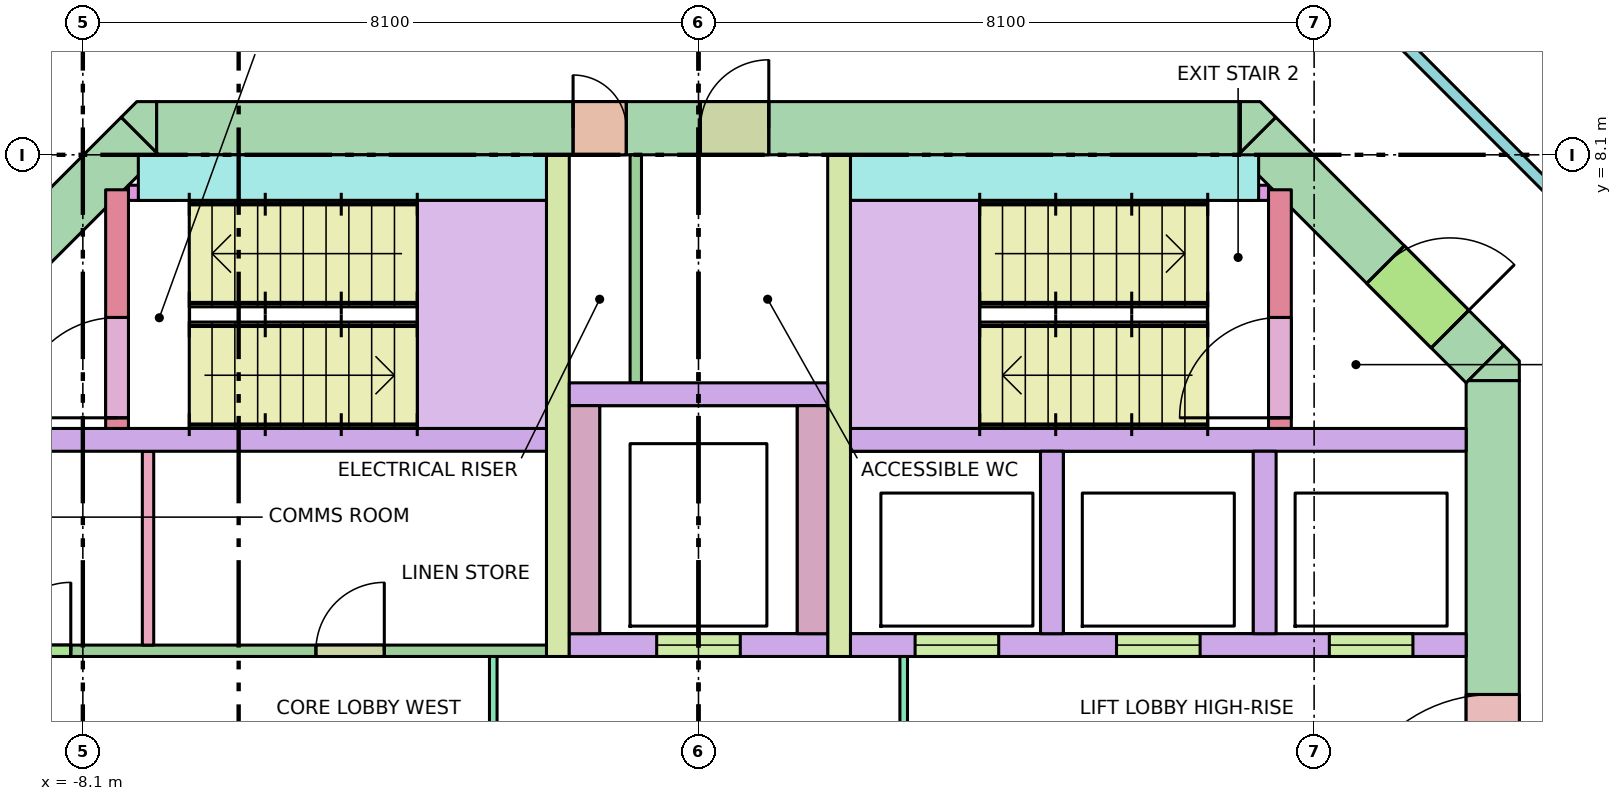
"""IFC4 building model, lengths in metres.
Left out: names, types, materials, properties, quantities, classifications, styles, units other than length and angle.
Written with IfcOpenShell. Run it as: python <this file> out.ifc"""

import sys

from ifc_helpers import new_model, si_unit, direction, frame, frame_2d, origin, place, context, subcontext, project, spatial, polyline, rectangle, outline, extrude, element, fill, save


model = new_model("IFC4")
c1 = context("Model", 3, precision=1e-05, world=origin(), true_north=direction((0.0, 1.0)))
c2 = subcontext(c1, "Body", "Model", "MODEL_VIEW")
j1 = project(units=[si_unit("LENGTHUNIT", "METRE"), si_unit("PLANEANGLEUNIT", "RADIAN")], contexts=[c1])
p1 = place(None, origin())
s1 = spatial("IfcSite", under=j1, at=p1, CompositionType="ELEMENT")
p2 = place(p1, origin())
s2 = spatial("IfcBuilding", under=s1, at=p2, CompositionType="ELEMENT")
p3 = place(p2, frame((0.0, 0.0, 176.4)))
s3 = spatial("IfcBuildingStorey", under=s2, at=p3, CompositionType="ELEMENT", Elevation=176.4)
p4 = place(p3, frame((-7.13, 8.45, -0.28), z_axis=(0.0, 0.0, 1.0), x_axis=(1.0, 0.0, 0.0)))
e1 = element("IfcWall", 1, at=p4, inside=s3, PredefinedType="SHEAR", context=c2, shape_type="SweptSolid", body=[
    extrude(rectangle(XDim=14.26, YDim=0.7, at=frame_2d((7.13, 0.0))), origin(), (0.0, 0.0, 1.0), 3.7),
])
p5 = place(p4, frame((5.48, 0.0, 0.28)))
e2 = element("IfcOpeningElement", 2, at=p5, cuts=e1, PredefinedType="OPENING", context=c2, shape_type="SweptSolid", body=[
    extrude(rectangle(XDim=0.7, YDim=2.1, at=frame_2d((0.35, 1.05))), frame((0.0, 0.36, 0.0), z_axis=(0.0, -1.0, 0.0), x_axis=(1.0, 0.0, 0.0)), (0.0, 0.0, 1.0), 0.72),
])
p6 = place(p4, frame((7.155, 0.0, 0.28)))
e3 = element("IfcOpeningElement", 3, at=p6, cuts=e1, PredefinedType="OPENING", context=c2, shape_type="SweptSolid", body=[
    extrude(rectangle(XDim=0.9, YDim=2.1, at=frame_2d((0.45, 1.05))), frame((0.0, 0.36, 0.0), z_axis=(0.0, -1.0, 0.0), x_axis=(1.0, 0.0, 0.0)), (0.0, 0.0, 1.0), 0.72),
])
p7 = place(p3, frame((10.45, -5.13, -0.28), z_axis=(0.0, 0.0, 1.0), x_axis=(0.0, 1.0, 0.0)))
e4 = element("IfcWall", 4, at=p7, inside=s3, PredefinedType="SHEAR", context=c2, shape_type="SweptSolid", body=[
    extrude(rectangle(XDim=10.26, YDim=0.7, at=frame_2d((5.13, 0.0))), origin(), (0.0, 0.0, 1.0), 3.7),
])
p8 = place(p7, frame((4.13, 0.0, 0.28)))
e5 = element("IfcOpeningElement", 5, at=p8, cuts=e4, PredefinedType="OPENING", context=c2, shape_type="SweptSolid", body=[
    extrude(rectangle(XDim=2.0, YDim=2.1, at=frame_2d((1.0, 1.05))), frame((0.0, 0.36, 0.0), z_axis=(0.0, -1.0, 0.0), x_axis=(1.0, 0.0, 0.0)), (0.0, 0.0, 1.0), 0.72),
])
p9 = place(p3, frame((-10.347, 5.347, -0.28), z_axis=(0.0, 0.0, 1.0), x_axis=(0.707106781187, 0.707106781187, 0.0)))
e6 = element("IfcWall", 6, at=p9, inside=s3, PredefinedType="SHEAR", context=c2, shape_type="SweptSolid", body=[
    extrude(rectangle(XDim=4.243, YDim=0.7, at=frame_2d((2.121, 0.0))), origin(), (0.0, 0.0, 1.0), 3.7),
])
p10 = place(p9, frame((0.65, 0.0, 0.28)))
e7 = element("IfcOpeningElement", 7, at=p10, cuts=e6, PredefinedType="OPENING", context=c2, shape_type="SweptSolid", body=[
    extrude(rectangle(XDim=1.2, YDim=2.1, at=frame_2d((0.6, 1.05))), frame((0.0, 0.36, 0.0), z_axis=(0.0, -1.0, 0.0), x_axis=(1.0, 0.0, 0.0)), (0.0, 0.0, 1.0), 0.72),
])
p11 = place(p3, frame((7.347, 8.347, -0.28), z_axis=(0.0, 0.0, 1.0), x_axis=(0.707106781187, -0.707106781187, 0.0)))
e8 = element("IfcWall", 8, at=p11, inside=s3, PredefinedType="SHEAR", context=c2, shape_type="SweptSolid", body=[
    extrude(rectangle(XDim=4.243, YDim=0.7, at=frame_2d((2.121, 0.0))), origin(), (0.0, 0.0, 1.0), 3.7),
])
p12 = place(p11, frame((2.393, 0.0, 0.28)))
e9 = element("IfcOpeningElement", 9, at=p12, cuts=e8, PredefinedType="OPENING", context=c2, shape_type="SweptSolid", body=[
    extrude(rectangle(XDim=1.2, YDim=2.1, at=frame_2d((0.6, 1.05))), frame((0.0, 0.36, 0.0), z_axis=(0.0, -1.0, 0.0), x_axis=(1.0, 0.0, 0.0)), (0.0, 0.0, 1.0), 0.72),
])
p13 = place(p3, frame((0.0, 0.0, -0.28)))
e10 = element("IfcWall", 10, at=p13, inside=s3, PredefinedType="SHEAR", context=c2, shape_type="SweptSolid", body=[
    extrude(outline(polyline([(10.8, 5.39), (10.8, 5.13), (10.8, 5.13), (10.13, 5.13), (10.595, 5.595), (10.595, 5.595), (10.595, 5.595), (10.8, 5.39)])), origin(), (0.0, 0.0, 1.0), 3.7),
])
p14 = place(p3, frame((0.0, 0.0, -0.28)))
e11 = element("IfcWall", 11, at=p14, inside=s3, PredefinedType="SHEAR", context=c2, shape_type="SweptSolid", body=[
    extrude(outline(polyline([(-7.39, 8.8), (-7.13, 8.8), (-7.13, 8.8), (-7.13, 8.13), (-7.595, 8.595), (-7.595, 8.595), (-7.595, 8.595), (-7.39, 8.8)])), origin(), (0.0, 0.0, 1.0), 3.7),
])
p15 = place(p3, frame((0.0, 0.0, -0.28)))
e12 = element("IfcWall", 12, at=p15, inside=s3, PredefinedType="SHEAR", context=c2, shape_type="SweptSolid", body=[
    extrude(outline(polyline([(7.39, 8.8), (7.595, 8.595), (7.595, 8.595), (7.595, 8.595), (7.13, 8.13), (7.13, 8.8), (7.13, 8.8), (7.39, 8.8)])), origin(), (0.0, 0.0, 1.0), 3.7),
])
for number, where, z_axis, x_axis in (
    (13, (-10.1, 4.35, 0.0), (0.0, 0.0, 1.0), (1.0, 0.0, 0.0)),
    (14, (2.0, 4.35, 0.0), (0.0, 0.0, 1.0), (1.0, 0.0, 0.0)),
):
    element("IfcWall", number, at=place(p3, frame(where, z_axis=z_axis, x_axis=x_axis)), inside=s3, PredefinedType="SOLIDWALL", context=c2, shape_type="SweptSolid", body=[
        extrude(rectangle(XDim=8.1, YDim=0.3, at=frame_2d((4.05, 0.0))), origin(), (0.0, 0.0, 1.0), 3.42),
    ])
p16 = place(p3, frame((2.0, 1.65, 0.0), z_axis=(0.0, 0.0, 1.0), x_axis=(1.0, 0.0, 0.0)))
e15 = element("IfcWall", 15, at=p16, inside=s3, PredefinedType="SOLIDWALL", context=c2, shape_type="SweptSolid", body=[
    extrude(rectangle(XDim=8.1, YDim=0.3, at=frame_2d((4.05, 0.0))), origin(), (0.0, 0.0, 1.0), 3.42),
])
p17 = place(p16, frame((0.85, 0.0, 0.0)))
e16 = element("IfcOpeningElement", 16, at=p17, cuts=e15, PredefinedType="OPENING", context=c2, shape_type="SweptSolid", body=[
    extrude(rectangle(XDim=1.1, YDim=2.1, at=frame_2d((0.55, 1.05))), frame((0.0, 0.16, 0.0), z_axis=(0.0, -1.0, 0.0), x_axis=(1.0, 0.0, 0.0)), (0.0, 0.0, 1.0), 0.32),
])
p18 = place(p16, frame((3.5, 0.0, 0.0)))
e17 = element("IfcOpeningElement", 17, at=p18, cuts=e15, PredefinedType="OPENING", context=c2, shape_type="SweptSolid", body=[
    extrude(rectangle(XDim=1.1, YDim=2.1, at=frame_2d((0.55, 1.05))), frame((0.0, 0.16, 0.0), z_axis=(0.0, -1.0, 0.0), x_axis=(1.0, 0.0, 0.0)), (0.0, 0.0, 1.0), 0.32),
])
p19 = place(p16, frame((6.3, 0.0, 0.0)))
e18 = element("IfcOpeningElement", 18, at=p19, cuts=e15, PredefinedType="OPENING", context=c2, shape_type="SweptSolid", body=[
    extrude(rectangle(XDim=1.1, YDim=2.1, at=frame_2d((0.55, 1.05))), frame((0.0, 0.16, 0.0), z_axis=(0.0, -1.0, 0.0), x_axis=(1.0, 0.0, 0.0)), (0.0, 0.0, 1.0), 0.32),
])
for number, where, z_axis, x_axis in (
    (19, (4.65, 1.8, 0.0), (0.0, 0.0, 1.0), (0.0, 1.0, 0.0)),
    (20, (7.45, 1.8, 0.0), (0.0, 0.0, 1.0), (0.0, 1.0, 0.0)),
):
    element("IfcWall", number, at=place(p3, frame(where, z_axis=z_axis, x_axis=x_axis)), inside=s3, PredefinedType="SOLIDWALL", context=c2, shape_type="SweptSolid", body=[
        extrude(rectangle(XDim=2.4, YDim=0.3, at=frame_2d((1.2, 0.0))), origin(), (0.0, 0.0, 1.0), 3.42),
    ])
for number, where, z_axis, x_axis in (
    (21, (-1.85, 1.5, 0.0), (0.0, 0.0, 1.0), (0.0, 1.0, 0.0)),
    (22, (1.85, 1.5, 0.0), (0.0, 0.0, 1.0), (0.0, 1.0, 0.0)),
):
    element("IfcWall", number, at=place(p3, frame(where, z_axis=z_axis, x_axis=x_axis)), inside=s3, PredefinedType="SHEAR", context=c2, shape_type="SweptSolid", body=[
        extrude(rectangle(XDim=6.6, YDim=0.3, at=frame_2d((3.3, 0.0))), origin(), (0.0, 0.0, 1.0), 3.42),
    ])
p20 = place(p3, frame((-1.7, 1.65, 0.0), z_axis=(0.0, 0.0, 1.0), x_axis=(1.0, 0.0, 0.0)))
e23 = element("IfcWall", 23, at=p20, inside=s3, PredefinedType="SOLIDWALL", context=c2, shape_type="SweptSolid", body=[
    extrude(rectangle(XDim=3.4, YDim=0.3, at=frame_2d((1.7, 0.0))), origin(), (0.0, 0.0, 1.0), 3.42),
])
p21 = place(p20, frame((1.15, 0.0, 0.0)))
e24 = element("IfcOpeningElement", 24, at=p21, cuts=e23, PredefinedType="OPENING", context=c2, shape_type="SweptSolid", body=[
    extrude(rectangle(XDim=1.1, YDim=2.1, at=frame_2d((0.55, 1.05))), frame((0.0, 0.16, 0.0), z_axis=(0.0, -1.0, 0.0), x_axis=(1.0, 0.0, 0.0)), (0.0, 0.0, 1.0), 0.32),
])
for number, where, z_axis, x_axis in (
    (25, (-1.5, 1.8, 0.0), (0.0, 0.0, 1.0), (0.0, 1.0, 0.0)),
    (26, (1.5, 1.8, 0.0), (0.0, 0.0, 1.0), (0.0, 1.0, 0.0)),
):
    element("IfcWall", number, at=place(p3, frame(where, z_axis=z_axis, x_axis=x_axis)), inside=s3, PredefinedType="SOLIDWALL", context=c2, shape_type="SweptSolid", body=[
        extrude(rectangle(XDim=3.0, YDim=0.4, at=frame_2d((1.5, 0.0))), origin(), (0.0, 0.0, 1.0), 3.42),
    ])
p22 = place(p3, frame((-1.7, 4.95, 0.0), z_axis=(0.0, 0.0, 1.0), x_axis=(1.0, 0.0, 0.0)))
e27 = element("IfcWall", 27, at=p22, inside=s3, PredefinedType="SOLIDWALL", context=c2, shape_type="SweptSolid", body=[
    extrude(rectangle(XDim=3.4, YDim=0.3, at=frame_2d((1.7, 0.0))), origin(), (0.0, 0.0, 1.0), 3.42),
])
p23 = place(p3, frame((-7.65, 4.5, 0.0), z_axis=(0.0, 0.0, 1.0), x_axis=(0.0, 1.0, 0.0)))
e28 = element("IfcWall", 28, at=p23, inside=s3, PredefinedType="SHEAR", context=c2, shape_type="SweptSolid", body=[
    extrude(rectangle(XDim=3.14, YDim=0.3, at=frame_2d((1.57, 0.0))), origin(), (0.0, 0.0, 1.0), 3.42),
])
p24 = place(p23, frame((0.14, 0.0, 0.0)))
e29 = element("IfcOpeningElement", 29, at=p24, cuts=e28, PredefinedType="OPENING", context=c2, shape_type="SweptSolid", body=[
    extrude(rectangle(XDim=1.32, YDim=2.1, at=frame_2d((0.66, 1.05))), frame((0.0, 0.16, 0.0), z_axis=(0.0, -1.0, 0.0), x_axis=(1.0, 0.0, 0.0)), (0.0, 0.0, 1.0), 0.32),
])
p25 = place(p3, frame((-7.37, 7.8, 0.0), z_axis=(0.0, 0.0, 1.0), x_axis=(1.0, 0.0, 0.0)))
e30 = element("IfcWall", 30, at=p25, inside=s3, PredefinedType="SHEAR", context=c2, shape_type="SweptSolid", body=[
    extrude(rectangle(XDim=5.37, YDim=0.6, at=frame_2d((2.685, 0.0))), origin(), (0.0, 0.0, 1.0), 3.42),
])
p26 = place(p3, frame((7.65, 4.5, 0.0), z_axis=(0.0, 0.0, 1.0), x_axis=(0.0, 1.0, 0.0)))
e31 = element("IfcWall", 31, at=p26, inside=s3, PredefinedType="SHEAR", context=c2, shape_type="SweptSolid", body=[
    extrude(rectangle(XDim=3.14, YDim=0.3, at=frame_2d((1.57, 0.0))), origin(), (0.0, 0.0, 1.0), 3.42),
])
p27 = place(p26, frame((0.14, 0.0, 0.0)))
e32 = element("IfcOpeningElement", 32, at=p27, cuts=e31, PredefinedType="OPENING", context=c2, shape_type="SweptSolid", body=[
    extrude(rectangle(XDim=1.32, YDim=2.1, at=frame_2d((0.66, 1.05))), frame((0.0, 0.16, 0.0), z_axis=(0.0, -1.0, 0.0), x_axis=(1.0, 0.0, 0.0)), (0.0, 0.0, 1.0), 0.32),
])
p28 = place(p3, frame((2.0, 7.8, 0.0), z_axis=(0.0, 0.0, 1.0), x_axis=(1.0, 0.0, 0.0)))
e33 = element("IfcWall", 33, at=p28, inside=s3, PredefinedType="SHEAR", context=c2, shape_type="SweptSolid", body=[
    extrude(rectangle(XDim=5.37, YDim=0.6, at=frame_2d((2.685, 0.0))), origin(), (0.0, 0.0, 1.0), 3.42),
])
for number, where, z_axis, x_axis in (
    (34, (-7.5, 7.6, 0.0), (0.0, 0.0, 1.0), (1.0, 0.0, 0.0)),
    (35, (6.9, 7.6, 0.0), (0.0, 0.0, 1.0), (1.0, 0.0, 0.0)),
):
    element("IfcWall", number, at=place(p3, frame(where, z_axis=z_axis, x_axis=x_axis)), inside=s3, PredefinedType="SHEAR", context=c2, shape_type="SweptSolid", body=[
        extrude(rectangle(XDim=0.6, YDim=0.2, at=frame_2d((0.3, 0.0))), origin(), (0.0, 0.0, 1.0), 3.42),
    ])
p29 = place(p3, frame((-2.7, -1.5, 0.0), z_axis=(0.0, 0.0, 1.0), x_axis=(0.0, 1.0, 0.0)))
e36 = element("IfcWall", 36, at=p29, inside=s3, PredefinedType="PARTITIONING", context=c2, shape_type="SweptSolid", body=[
    extrude(rectangle(XDim=3.0, YDim=0.1, at=frame_2d((1.5, 0.0))), origin(), (0.0, 0.0, 1.0), 3.42),
])
p30 = place(p29, frame((0.9, 0.0, 0.0)))
e37 = element("IfcOpeningElement", 37, at=p30, cuts=e36, PredefinedType="OPENING", context=c2, shape_type="SweptSolid", body=[
    extrude(rectangle(XDim=1.2, YDim=2.1, at=frame_2d((0.6, 1.05))), frame((0.0, 0.06, 0.0), z_axis=(0.0, -1.0, 0.0), x_axis=(1.0, 0.0, 0.0)), (0.0, 0.0, 1.0), 0.12),
])
p31 = place(p3, frame((2.7, -1.5, 0.0), z_axis=(0.0, 0.0, 1.0), x_axis=(0.0, 1.0, 0.0)))
e38 = element("IfcWall", 38, at=p31, inside=s3, PredefinedType="PARTITIONING", context=c2, shape_type="SweptSolid", body=[
    extrude(rectangle(XDim=3.0, YDim=0.1, at=frame_2d((1.5, 0.0))), origin(), (0.0, 0.0, 1.0), 3.42),
])
p32 = place(p31, frame((0.9, 0.0, 0.0)))
e39 = element("IfcOpeningElement", 39, at=p32, cuts=e38, PredefinedType="OPENING", context=c2, shape_type="SweptSolid", body=[
    extrude(rectangle(XDim=1.2, YDim=2.1, at=frame_2d((0.6, 1.05))), frame((0.0, 0.06, 0.0), z_axis=(0.0, -1.0, 0.0), x_axis=(1.0, 0.0, 0.0)), (0.0, 0.0, 1.0), 0.12),
])
p33 = place(p3, frame((-0.825, 5.1, 0.0), z_axis=(0.0, 0.0, 1.0), x_axis=(0.0, 1.0, 0.0)))
e40 = element("IfcWall", 40, at=p33, inside=s3, PredefinedType="PARTITIONING", context=c2, shape_type="SweptSolid", body=[
    extrude(rectangle(XDim=3.0, YDim=0.15, at=frame_2d((1.5, 0.0))), origin(), (0.0, 0.0, 1.0), 3.42),
])
p34 = place(p3, frame((-7.242, 1.65, 0.0), z_axis=(0.0, 0.0, 1.0), x_axis=(0.0, 1.0, 0.0)))
e41 = element("IfcWall", 41, at=p34, inside=s3, PredefinedType="PARTITIONING", context=c2, shape_type="SweptSolid", body=[
    extrude(rectangle(XDim=2.55, YDim=0.15, at=frame_2d((1.275, 0.0))), origin(), (0.0, 0.0, 1.0), 3.42),
])
p35 = place(p3, frame((-10.1, 1.575, 0.0), z_axis=(0.0, 0.0, 1.0), x_axis=(1.0, 0.0, 0.0)))
e42 = element("IfcWall", 42, at=p35, inside=s3, PredefinedType="PARTITIONING", context=c2, shape_type="SweptSolid", body=[
    extrude(rectangle(XDim=8.1, YDim=0.15, at=frame_2d((4.05, 0.0))), origin(), (0.0, 0.0, 1.0), 3.42),
])
p36 = place(p35, frame((0.941, 0.0, 0.0)))
e43 = element("IfcOpeningElement", 43, at=p36, cuts=e42, PredefinedType="OPENING", context=c2, shape_type="SweptSolid", body=[
    extrude(rectangle(XDim=0.9, YDim=2.1, at=frame_2d((0.45, 1.05))), frame((0.0, 0.085, 0.0), z_axis=(0.0, -1.0, 0.0), x_axis=(1.0, 0.0, 0.0)), (0.0, 0.0, 1.0), 0.17),
])
p37 = place(p35, frame((5.066, 0.0, 0.0)))
e44 = element("IfcOpeningElement", 44, at=p37, cuts=e42, PredefinedType="OPENING", context=c2, shape_type="SweptSolid", body=[
    extrude(rectangle(XDim=0.9, YDim=2.1, at=frame_2d((0.45, 1.05))), frame((0.0, 0.085, 0.0), z_axis=(0.0, -1.0, 0.0), x_axis=(1.0, 0.0, 0.0)), (0.0, 0.0, 1.0), 0.17),
])
p38 = place(p3, frame((-12.638, 6.204, 0.0), z_axis=(0.0, 0.0, 1.0), x_axis=(0.707106781187, 0.707106781187, 0.0)))
e45 = element("IfcWall", 45, at=p38, inside=s3, PredefinedType="PARTITIONING", context=c2, shape_type="SweptSolid", body=[
    extrude(rectangle(XDim=6.271, YDim=0.15, at=frame_2d((3.135, 0.0))), origin(), (0.0, 0.0, 1.0), 2.62),
])
p39 = place(p38, frame((4.935, 0.0, 0.0)))
e46 = element("IfcOpeningElement", 46, at=p39, cuts=e45, PredefinedType="OPENING", context=c2, shape_type="SweptSolid", body=[
    extrude(rectangle(XDim=0.9, YDim=2.1, at=frame_2d((0.45, 1.05))), frame((0.0, 0.085, 0.0), z_axis=(0.0, -1.0, 0.0), x_axis=(1.0, 0.0, 0.0)), (0.0, 0.0, 1.0), 0.17),
])
p40 = place(p3, frame((8.204, 10.638, 0.0), z_axis=(0.0, 0.0, 1.0), x_axis=(0.707106781187, -0.707106781187, 0.0)))
e47 = element("IfcWall", 47, at=p40, inside=s3, PredefinedType="PARTITIONING", context=c2, shape_type="SweptSolid", body=[
    extrude(rectangle(XDim=6.271, YDim=0.15, at=frame_2d((3.135, 0.0))), origin(), (0.0, 0.0, 1.0), 2.62),
])
p41 = place(p17, origin())
e48 = element("IfcDoor", 48, at=p41, inside=s3, OperationType="DOUBLE_DOOR_SLIDING", PredefinedType="DOOR", context=c2, shape_type="SweptSolid", body=[
    extrude(rectangle(XDim=1.1, YDim=2.1, at=frame_2d((0.55, 1.05))), frame((0.0, 0.025, 0.0), z_axis=(0.0, -1.0, 0.0), x_axis=(1.0, 0.0, 0.0)), (0.0, 0.0, 1.0), 0.05),
])
fill(e16, e48)
p42 = place(p18, origin())
e49 = element("IfcDoor", 49, at=p42, inside=s3, OperationType="DOUBLE_DOOR_SLIDING", PredefinedType="DOOR", context=c2, shape_type="SweptSolid", body=[
    extrude(rectangle(XDim=1.1, YDim=2.1, at=frame_2d((0.55, 1.05))), frame((0.0, 0.025, 0.0), z_axis=(0.0, -1.0, 0.0), x_axis=(1.0, 0.0, 0.0)), (0.0, 0.0, 1.0), 0.05),
])
fill(e17, e49)
p43 = place(p19, origin())
e50 = element("IfcDoor", 50, at=p43, inside=s3, OperationType="DOUBLE_DOOR_SLIDING", PredefinedType="DOOR", context=c2, shape_type="SweptSolid", body=[
    extrude(rectangle(XDim=1.1, YDim=2.1, at=frame_2d((0.55, 1.05))), frame((0.0, 0.025, 0.0), z_axis=(0.0, -1.0, 0.0), x_axis=(1.0, 0.0, 0.0)), (0.0, 0.0, 1.0), 0.05),
])
fill(e18, e50)
p44 = place(p21, origin())
e51 = element("IfcDoor", 51, at=p44, inside=s3, OperationType="DOUBLE_DOOR_SLIDING", PredefinedType="DOOR", context=c2, shape_type="SweptSolid", body=[
    extrude(rectangle(XDim=1.1, YDim=2.1, at=frame_2d((0.55, 1.05))), frame((0.0, 0.025, 0.0), z_axis=(0.0, -1.0, 0.0), x_axis=(1.0, 0.0, 0.0)), (0.0, 0.0, 1.0), 0.05),
])
fill(e24, e51)
p45 = place(p24, origin())
e52 = element("IfcDoor", 52, at=p45, inside=s3, OperationType="DOUBLE_DOOR_SINGLE_SWING", PredefinedType="DOOR", context=c2, shape_type="SweptSolid", body=[
    extrude(rectangle(XDim=1.32, YDim=2.1, at=frame_2d((0.66, 1.05))), frame((0.0, 0.025, 0.0), z_axis=(0.0, -1.0, 0.0), x_axis=(1.0, 0.0, 0.0)), (0.0, 0.0, 1.0), 0.05),
])
fill(e29, e52)
p46 = place(p27, origin())
e53 = element("IfcDoor", 53, at=p46, inside=s3, OperationType="DOUBLE_DOOR_SINGLE_SWING", PredefinedType="DOOR", context=c2, shape_type="SweptSolid", body=[
    extrude(rectangle(XDim=1.32, YDim=2.1, at=frame_2d((0.66, 1.05))), frame((0.0, 0.025, 0.0), z_axis=(0.0, -1.0, 0.0), x_axis=(1.0, 0.0, 0.0)), (0.0, 0.0, 1.0), 0.05),
])
fill(e32, e53)
p47 = place(p12, origin())
e54 = element("IfcDoor", 54, at=p47, inside=s3, OperationType="SINGLE_SWING_RIGHT", PredefinedType="DOOR", context=c2, shape_type="SweptSolid", body=[
    extrude(rectangle(XDim=1.2, YDim=2.1, at=frame_2d((0.6, 1.05))), frame((0.0, 0.025, 0.0), z_axis=(0.0, -1.0, 0.0), x_axis=(1.0, 0.0, 0.0)), (0.0, 0.0, 1.0), 0.05),
])
fill(e9, e54)
p48 = place(p8, origin())
e55 = element("IfcDoor", 55, at=p48, inside=s3, OperationType="DOUBLE_DOOR_SINGLE_SWING", PredefinedType="DOOR", context=c2, shape_type="SweptSolid", body=[
    extrude(rectangle(XDim=2.0, YDim=2.1, at=frame_2d((1.0, 1.05))), frame((0.0, 0.025, 0.0), z_axis=(0.0, -1.0, 0.0), x_axis=(1.0, 0.0, 0.0)), (0.0, 0.0, 1.0), 0.05),
])
fill(e5, e55)
p49 = place(p5, origin())
e56 = element("IfcDoor", 56, at=p49, inside=s3, OperationType="SINGLE_SWING_LEFT", PredefinedType="DOOR", context=c2, shape_type="SweptSolid", body=[
    extrude(rectangle(XDim=0.7, YDim=2.1, at=frame_2d((0.35, 1.05))), frame((0.0, 0.025, 0.0), z_axis=(0.0, -1.0, 0.0), x_axis=(1.0, 0.0, 0.0)), (0.0, 0.0, 1.0), 0.05),
])
fill(e2, e56)
p50 = place(p6, origin())
e57 = element("IfcDoor", 57, at=p50, inside=s3, OperationType="SINGLE_SWING_RIGHT", PredefinedType="DOOR", context=c2, shape_type="SweptSolid", body=[
    extrude(rectangle(XDim=0.9, YDim=2.1, at=frame_2d((0.45, 1.05))), frame((0.0, 0.025, 0.0), z_axis=(0.0, -1.0, 0.0), x_axis=(1.0, 0.0, 0.0)), (0.0, 0.0, 1.0), 0.05),
])
fill(e3, e57)
p51 = place(p36, origin())
e58 = element("IfcDoor", 58, at=p51, inside=s3, OperationType="SINGLE_SWING_RIGHT", PredefinedType="DOOR", context=c2, shape_type="SweptSolid", body=[
    extrude(rectangle(XDim=0.9, YDim=2.1, at=frame_2d((0.45, 1.05))), frame((0.0, 0.025, 0.0), z_axis=(0.0, -1.0, 0.0), x_axis=(1.0, 0.0, 0.0)), (0.0, 0.0, 1.0), 0.05),
])
fill(e43, e58)
p52 = place(p37, origin())
e59 = element("IfcDoor", 59, at=p52, inside=s3, OperationType="SINGLE_SWING_RIGHT", PredefinedType="DOOR", context=c2, shape_type="SweptSolid", body=[
    extrude(rectangle(XDim=0.9, YDim=2.1, at=frame_2d((0.45, 1.05))), frame((0.0, 0.025, 0.0), z_axis=(0.0, -1.0, 0.0), x_axis=(1.0, 0.0, 0.0)), (0.0, 0.0, 1.0), 0.05),
])
fill(e44, e59)
save(model, sys.argv[1])
